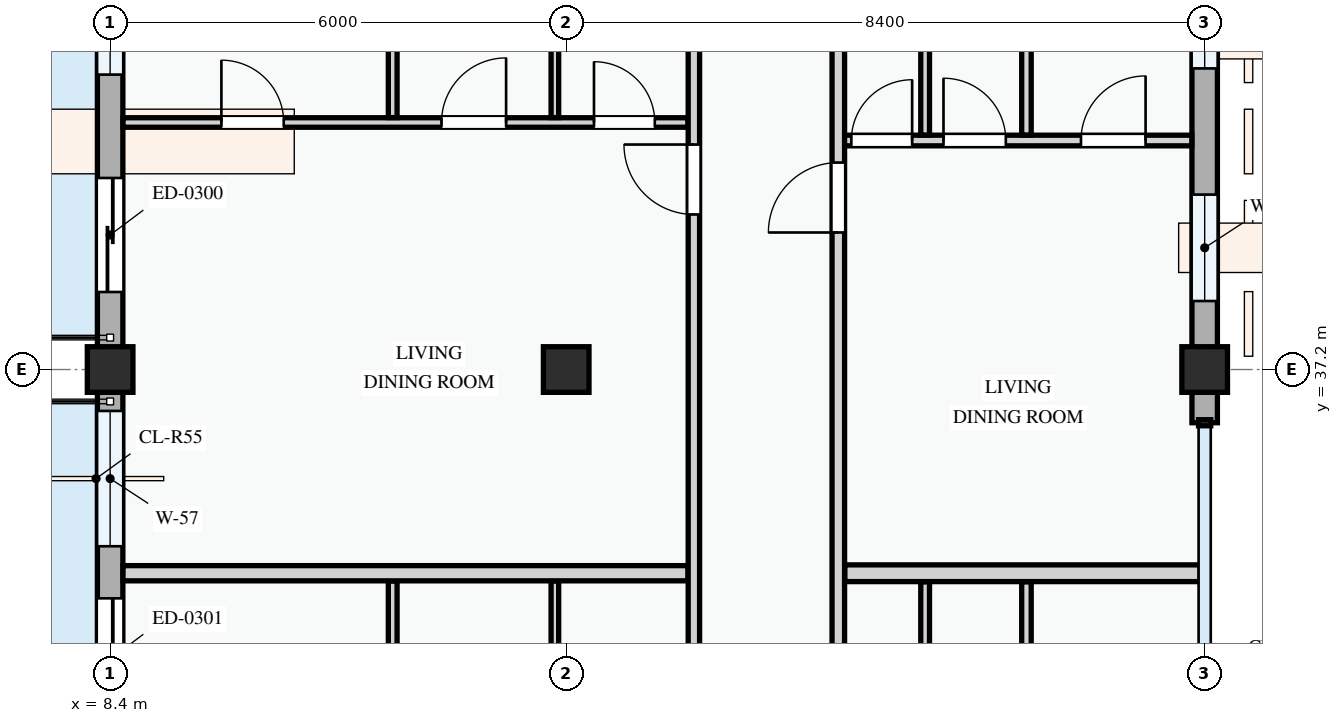
"""IFC4 building model, lengths in metres.
Left out: names, types, materials, properties, quantities, classifications, styles, units other than length and angle.
Written with IfcOpenShell. Run it as: python <this file> out.ifc"""

import sys

from ifc_helpers import new_model, si_unit, direction, frame, frame_2d, origin, origin_2d, place, context, subcontext, project, spatial, rectangle, extrude, element, fill, save


model = new_model("IFC4")
c1 = context("Model", 3, precision=1e-05, world=origin(), true_north=direction((0.0, 1.0)))
c2 = subcontext(c1, "Body", "Model", "MODEL_VIEW")
j1 = project(units=[si_unit("LENGTHUNIT", "METRE"), si_unit("PLANEANGLEUNIT", "RADIAN")], contexts=[c1])
p1 = place(None, origin())
s1 = spatial("IfcSite", under=j1, at=p1, CompositionType="ELEMENT")
p2 = place(p1, origin())
s2 = spatial("IfcBuilding", under=s1, at=p2, CompositionType="ELEMENT")
p3 = place(p2, frame((0.0, 0.0, 11.4)))
s3 = spatial("IfcBuildingStorey", under=s2, at=p3, CompositionType="ELEMENT", Elevation=11.4)
for number, where, z_axis, x_axis in (
    (1, (8.4, 37.2, 0.0), (0.0, 0.0, 1.0), (1.0, 0.0, 0.0)),
    (2, (14.4, 37.2, 0.0), (0.0, 0.0, 1.0), (1.0, 0.0, 0.0)),
    (3, (22.8, 37.2, 0.0), (0.0, 0.0, 1.0), (1.0, 0.0, 0.0)),
):
    element("IfcColumn", number, at=place(p3, frame(where, z_axis=z_axis, x_axis=x_axis)), inside=s3, PredefinedType="COLUMN", context=c2, shape_type="SweptSolid", body=[
        extrude(rectangle(XDim=0.6, YDim=0.6, at=origin_2d()), origin(), (0.0, 0.0, 1.0), 3.3),
    ])
p4 = place(p3, frame((22.8, 36.5, 0.0), z_axis=(0.0, 0.0, 1.0), x_axis=(0.0, 1.0, 0.0)))
e4 = element("IfcWall", 4, at=p4, inside=s3, PredefinedType="STANDARD", context=c2, shape_type="SweptSolid", body=[
    extrude(rectangle(XDim=0.7, YDim=0.335, at=frame_2d((0.35, 0.0))), origin(), (0.0, 0.0, 1.0), 2.425),
])
p5 = place(p3, frame((22.8, 37.2, 0.0), z_axis=(0.0, 0.0, 1.0), x_axis=(0.0, 1.0, 0.0)))
e5 = element("IfcWall", 5, at=p5, inside=s3, PredefinedType="STANDARD", context=c2, shape_type="SweptSolid", body=[
    extrude(rectangle(XDim=6.0, YDim=0.335, at=frame_2d((3.0, 0.0))), origin(), (0.0, 0.0, 1.0), 2.575),
])
p6 = place(p5, frame((0.901, 0.0, 0.78)))
e6 = element("IfcOpeningElement", 6, at=p6, cuts=e5, PredefinedType="OPENING", context=c2, shape_type="SweptSolid", body=[
    extrude(rectangle(XDim=1.4, YDim=1.45, at=frame_2d((0.7, 0.725))), frame((0.0, 0.177, 0.0), z_axis=(0.0, -1.0, 0.0), x_axis=(1.0, 0.0, 0.0)), (0.0, 0.0, 1.0), 0.355),
])
p7 = place(p5, frame((3.961, 0.0, 0.78)))
e7 = element("IfcOpeningElement", 7, at=p7, cuts=e5, PredefinedType="OPENING", context=c2, shape_type="SweptSolid", body=[
    extrude(rectangle(XDim=0.9, YDim=1.2, at=frame_2d((0.45, 0.6))), frame((0.0, 0.177, 0.0), z_axis=(0.0, -1.0, 0.0), x_axis=(1.0, 0.0, 0.0)), (0.0, 0.0, 1.0), 0.355),
])
p8 = place(p3, frame((8.4, 43.2, 0.0), z_axis=(0.0, 0.0, 1.0), x_axis=(0.0, -1.0, 0.0)))
e8 = element("IfcWall", 8, at=p8, inside=s3, PredefinedType="STANDARD", context=c2, shape_type="SweptSolid", body=[
    extrude(rectangle(XDim=6.0, YDim=0.335, at=frame_2d((3.0, 0.0))), origin(), (0.0, 0.0, 1.0), 2.575),
])
p9 = place(p8, frame((3.48, 0.0, 0.0)))
e9 = element("IfcOpeningElement", 9, at=p9, cuts=e8, PredefinedType="OPENING", context=c2, shape_type="SweptSolid", body=[
    extrude(rectangle(XDim=1.5, YDim=2.2, at=frame_2d((0.75, 1.1))), frame((0.0, 0.177, 0.0), z_axis=(0.0, -1.0, 0.0), x_axis=(1.0, 0.0, 0.0)), (0.0, 0.0, 1.0), 0.355),
])
p10 = place(p8, frame((0.82, 0.0, 0.78)))
e10 = element("IfcOpeningElement", 10, at=p10, cuts=e8, PredefinedType="OPENING", context=c2, shape_type="SweptSolid", body=[
    extrude(rectangle(XDim=1.3, YDim=1.4, at=frame_2d((0.65, 0.7))), frame((0.0, 0.177, 0.0), z_axis=(0.0, -1.0, 0.0), x_axis=(1.0, 0.0, 0.0)), (0.0, 0.0, 1.0), 0.355),
])
p11 = place(p3, frame((8.4, 37.2, 0.0), z_axis=(0.0, 0.0, 1.0), x_axis=(0.0, -1.0, 0.0)))
e11 = element("IfcWall", 11, at=p11, inside=s3, PredefinedType="STANDARD", context=c2, shape_type="SweptSolid", body=[
    extrude(rectangle(XDim=8.4, YDim=0.335, at=frame_2d((4.2, 0.0))), origin(), (0.0, 0.0, 1.0), 2.425),
])
p12 = place(p11, frame((3.01, 0.0, 0.0)))
e12 = element("IfcOpeningElement", 12, at=p12, cuts=e11, PredefinedType="OPENING", context=c2, shape_type="SweptSolid", body=[
    extrude(rectangle(XDim=1.6, YDim=2.2, at=frame_2d((0.8, 1.1))), frame((0.0, 0.177, 0.0), z_axis=(0.0, -1.0, 0.0), x_axis=(1.0, 0.0, 0.0)), (0.0, 0.0, 1.0), 0.355),
])
p13 = place(p11, frame((0.545, 0.0, 0.78)))
e13 = element("IfcOpeningElement", 13, at=p13, cuts=e11, PredefinedType="OPENING", context=c2, shape_type="SweptSolid", body=[
    extrude(rectangle(XDim=1.78, YDim=1.42, at=frame_2d((0.89, 0.71))), frame((0.0, 0.177, 0.0), z_axis=(0.0, -1.0, 0.0), x_axis=(1.0, 0.0, 0.0)), (0.0, 0.0, 1.0), 0.355),
])
p14 = place(p11, frame((5.695, 0.0, 0.78)))
e14 = element("IfcOpeningElement", 14, at=p14, cuts=e11, PredefinedType="OPENING", context=c2, shape_type="SweptSolid", body=[
    extrude(rectangle(XDim=1.48, YDim=1.52, at=frame_2d((0.74, 0.76))), frame((0.0, 0.177, 0.0), z_axis=(0.0, -1.0, 0.0), x_axis=(1.0, 0.0, 0.0)), (0.0, 0.0, 1.0), 0.355),
])
p15 = place(p3, frame((12.118, 27.054, 0.0), z_axis=(0.0, 0.0, 1.0), x_axis=(0.0, 1.0, 0.0)))
e15 = element("IfcWall", 15, at=p15, inside=s3, PredefinedType="PARTITIONING", context=c2, shape_type="SweptSolid", body=[
    extrude(rectangle(XDim=7.364, YDim=0.115, at=frame_2d((3.682, 0.0))), origin(), (0.0, 0.0, 1.0), 3.0),
])
p16 = place(p3, frame((14.251, 27.054, 0.0), z_axis=(0.0, 0.0, 1.0), x_axis=(0.0, 1.0, 0.0)))
e16 = element("IfcWall", 16, at=p16, inside=s3, PredefinedType="PARTITIONING", context=c2, shape_type="SweptSolid", body=[
    extrude(rectangle(XDim=7.364, YDim=0.1, at=frame_2d((3.682, 0.0))), origin(), (0.0, 0.0, 1.0), 2.425),
])
p17 = place(p3, frame((20.455, 27.125, 0.0), z_axis=(0.0, 0.0, 1.0), x_axis=(0.0, 1.0, 0.0)))
e17 = element("IfcWall", 17, at=p17, inside=s3, PredefinedType="PARTITIONING", context=c2, shape_type="SweptSolid", body=[
    extrude(rectangle(XDim=7.283, YDim=0.125, at=frame_2d((3.642, 0.0))), origin(), (0.0, 0.0, 1.0), 3.0),
])
p18 = place(p3, frame((19.122, 27.125, 0.0), z_axis=(0.0, 0.0, 1.0), x_axis=(0.0, 1.0, 0.0)))
e18 = element("IfcWall", 18, at=p18, inside=s3, PredefinedType="PARTITIONING", context=c2, shape_type="SweptSolid", body=[
    extrude(rectangle(XDim=7.283, YDim=0.115, at=frame_2d((3.642, 0.0))), origin(), (0.0, 0.0, 1.0), 3.0),
])
p19 = place(p3, frame((8.57, 40.45, 0.0), z_axis=(0.0, 0.0, 1.0), x_axis=(1.0, 0.0, 0.0)))
e19 = element("IfcWall", 19, at=p19, inside=s3, PredefinedType="PARTITIONING", context=c2, shape_type="SweptSolid", body=[
    extrude(rectangle(XDim=7.433, YDim=0.125, at=frame_2d((3.717, 0.0))), origin(), (0.0, 0.0, 1.0), 3.0),
])
p20 = place(p19, frame((1.294, 0.0, 0.0)))
e20 = element("IfcOpeningElement", 20, at=p20, cuts=e19, PredefinedType="OPENING", context=c2, shape_type="SweptSolid", body=[
    extrude(rectangle(XDim=0.82, YDim=2.08, at=frame_2d((0.41, 1.04))), frame((0.0, 0.073, 0.0), z_axis=(0.0, -1.0, 0.0), x_axis=(1.0, 0.0, 0.0)), (0.0, 0.0, 1.0), 0.145),
])
p21 = place(p19, frame((4.19, 0.0, 0.0)))
e21 = element("IfcOpeningElement", 21, at=p21, cuts=e19, PredefinedType="OPENING", context=c2, shape_type="SweptSolid", body=[
    extrude(rectangle(XDim=0.85, YDim=2.1, at=frame_2d((0.425, 1.05))), frame((0.0, 0.073, 0.0), z_axis=(0.0, -1.0, 0.0), x_axis=(1.0, 0.0, 0.0)), (0.0, 0.0, 1.0), 0.145),
])
p22 = place(p19, frame((6.196, 0.0, 0.0)))
e22 = element("IfcOpeningElement", 22, at=p22, cuts=e19, PredefinedType="OPENING", context=c2, shape_type="SweptSolid", body=[
    extrude(rectangle(XDim=0.8, YDim=2.1, at=frame_2d((0.4, 1.05))), frame((0.0, 0.073, 0.0), z_axis=(0.0, -1.0, 0.0), x_axis=(1.0, 0.0, 0.0)), (0.0, 0.0, 1.0), 0.145),
])
p23 = place(p3, frame((12.118, 40.514, 0.0), z_axis=(0.0, 0.0, 1.0), x_axis=(0.0, 1.0, 0.0)))
e23 = element("IfcWall", 23, at=p23, inside=s3, PredefinedType="PARTITIONING", context=c2, shape_type="SweptSolid", body=[
    extrude(rectangle(XDim=5.771, YDim=0.115, at=frame_2d((2.885, 0.0))), origin(), (0.0, 0.0, 1.0), 3.0),
])
p24 = place(p3, frame((14.251, 40.514, 0.0), z_axis=(0.0, 0.0, 1.0), x_axis=(0.0, 1.0, 0.0)))
e24 = element("IfcWall", 24, at=p24, inside=s3, PredefinedType="PARTITIONING", context=c2, shape_type="SweptSolid", body=[
    extrude(rectangle(XDim=5.771, YDim=0.1, at=frame_2d((2.885, 0.0))), origin(), (0.0, 0.0, 1.0), 2.425),
])
p25 = place(p3, frame((17.98, 40.213, 0.0), z_axis=(0.0, 0.0, 1.0), x_axis=(1.0, 0.0, 0.0)))
e25 = element("IfcWall", 25, at=p25, inside=s3, PredefinedType="PARTITIONING", context=c2, shape_type="SweptSolid", body=[
    extrude(rectangle(XDim=4.651, YDim=0.14, at=frame_2d((2.325, 0.0))), origin(), (0.0, 0.0, 1.0), 3.0),
])
p26 = place(p25, frame((0.171, 0.0, 0.0)))
e26 = element("IfcOpeningElement", 26, at=p26, cuts=e25, PredefinedType="OPENING", context=c2, shape_type="SweptSolid", body=[
    extrude(rectangle(XDim=0.8, YDim=2.1, at=frame_2d((0.4, 1.05))), frame((0.0, 0.08, 0.0), z_axis=(0.0, -1.0, 0.0), x_axis=(1.0, 0.0, 0.0)), (0.0, 0.0, 1.0), 0.16),
])
p27 = place(p25, frame((1.384, 0.0, 0.0)))
e27 = element("IfcOpeningElement", 27, at=p27, cuts=e25, PredefinedType="OPENING", context=c2, shape_type="SweptSolid", body=[
    extrude(rectangle(XDim=0.82, YDim=2.08, at=frame_2d((0.41, 1.04))), frame((0.0, 0.08, 0.0), z_axis=(0.0, -1.0, 0.0), x_axis=(1.0, 0.0, 0.0)), (0.0, 0.0, 1.0), 0.16),
])
p28 = place(p25, frame((3.193, 0.0, 0.0)))
e28 = element("IfcOpeningElement", 28, at=p28, cuts=e25, PredefinedType="OPENING", context=c2, shape_type="SweptSolid", body=[
    extrude(rectangle(XDim=0.85, YDim=2.1, at=frame_2d((0.425, 1.05))), frame((0.0, 0.08, 0.0), z_axis=(0.0, -1.0, 0.0), x_axis=(1.0, 0.0, 0.0)), (0.0, 0.0, 1.0), 0.16),
])
p29 = place(p3, frame((20.455, 40.285, 0.0), z_axis=(0.0, 0.0, 1.0), x_axis=(0.0, 1.0, 0.0)))
e29 = element("IfcWall", 29, at=p29, inside=s3, PredefinedType="PARTITIONING", context=c2, shape_type="SweptSolid", body=[
    extrude(rectangle(XDim=5.993, YDim=0.125, at=frame_2d((2.997, 0.0))), origin(), (0.0, 0.0, 1.0), 3.0),
])
p30 = place(p3, frame((19.122, 40.285, 0.0), z_axis=(0.0, 0.0, 1.0), x_axis=(0.0, 1.0, 0.0)))
e30 = element("IfcWall", 30, at=p30, inside=s3, PredefinedType="PARTITIONING", context=c2, shape_type="SweptSolid", body=[
    extrude(rectangle(XDim=5.993, YDim=0.115, at=frame_2d((2.997, 0.0))), origin(), (0.0, 0.0, 1.0), 3.0),
])
p31 = place(p3, frame((8.57, 34.52, 0.0), z_axis=(0.0, 0.0, 1.0), x_axis=(1.0, 0.0, 0.0)))
e31 = element("IfcWall", 31, at=p31, inside=s3, PredefinedType="PARTITIONING", context=c2, shape_type="SweptSolid", body=[
    extrude(rectangle(XDim=7.433, YDim=0.2, at=frame_2d((3.717, 0.0))), origin(), (0.0, 0.0, 1.0), 3.0),
])
p32 = place(p3, frame((18.064, 34.52, 0.0), z_axis=(0.0, 0.0, 1.0), x_axis=(1.0, 0.0, 0.0)))
e32 = element("IfcWall", 32, at=p32, inside=s3, PredefinedType="PARTITIONING", context=c2, shape_type="SweptSolid", body=[
    extrude(rectangle(XDim=4.676, YDim=0.22, at=frame_2d((2.338, 0.0))), origin(), (0.0, 0.0, 1.0), 3.0),
])
p33 = place(p3, frame((16.08, 22.66, 0.0), z_axis=(0.0, 0.0, 1.0), x_axis=(0.0, 1.0, 0.0)))
e33 = element("IfcWall", 33, at=p33, inside=s3, PredefinedType="PARTITIONING", context=c2, shape_type="SweptSolid", body=[
    extrude(rectangle(XDim=34.771, YDim=0.15, at=frame_2d((17.385, 0.0))), origin(), (0.0, 0.0, 1.0), 3.0),
])
p34 = place(p33, frame((2.672, 0.0, 0.0)))
e34 = element("IfcOpeningElement", 34, at=p34, cuts=e33, PredefinedType="OPENING", context=c2, shape_type="SweptSolid", body=[
    extrude(rectangle(XDim=0.92, YDim=2.1, at=frame_2d((0.46, 1.05))), frame((0.0, 0.085, 0.0), z_axis=(0.0, -1.0, 0.0), x_axis=(1.0, 0.0, 0.0)), (0.0, 0.0, 1.0), 0.17),
])
p35 = place(p33, frame((16.58, 0.0, 0.0)))
e35 = element("IfcOpeningElement", 35, at=p35, cuts=e33, PredefinedType="OPENING", context=c2, shape_type="SweptSolid", body=[
    extrude(rectangle(XDim=0.92, YDim=2.1, at=frame_2d((0.46, 1.05))), frame((0.0, 0.085, 0.0), z_axis=(0.0, -1.0, 0.0), x_axis=(1.0, 0.0, 0.0)), (0.0, 0.0, 1.0), 0.17),
])
p36 = place(p33, frame((24.315, 0.0, 0.0)))
e36 = element("IfcOpeningElement", 36, at=p36, cuts=e33, PredefinedType="OPENING", context=c2, shape_type="SweptSolid", body=[
    extrude(rectangle(XDim=0.96, YDim=2.12, at=frame_2d((0.48, 1.06))), frame((0.0, 0.085, 0.0), z_axis=(0.0, -1.0, 0.0), x_axis=(1.0, 0.0, 0.0)), (0.0, 0.0, 1.0), 0.17),
])
p37 = place(p3, frame((17.98, 22.66, 0.0), z_axis=(0.0, 0.0, 1.0), x_axis=(0.0, 1.0, 0.0)))
e37 = element("IfcWall", 37, at=p37, inside=s3, PredefinedType="PARTITIONING", context=c2, shape_type="SweptSolid", body=[
    extrude(rectangle(XDim=34.771, YDim=0.165, at=frame_2d((17.385, 0.0))), origin(), (0.0, 0.0, 1.0), 3.0),
])
p38 = place(p37, frame((2.633, 0.0, 0.0)))
e38 = element("IfcOpeningElement", 38, at=p38, cuts=e37, PredefinedType="OPENING", context=c2, shape_type="SweptSolid", body=[
    extrude(rectangle(XDim=0.92, YDim=2.1, at=frame_2d((0.46, 1.05))), frame((0.0, 0.093, 0.0), z_axis=(0.0, -1.0, 0.0), x_axis=(1.0, 0.0, 0.0)), (0.0, 0.0, 1.0), 0.185),
])
p39 = place(p37, frame((16.343, 0.0, 0.0)))
e39 = element("IfcOpeningElement", 39, at=p39, cuts=e37, PredefinedType="OPENING", context=c2, shape_type="SweptSolid", body=[
    extrude(rectangle(XDim=0.92, YDim=2.1, at=frame_2d((0.46, 1.05))), frame((0.0, 0.093, 0.0), z_axis=(0.0, -1.0, 0.0), x_axis=(1.0, 0.0, 0.0)), (0.0, 0.0, 1.0), 0.185),
])
p40 = place(p37, frame((24.313, 0.0, 0.0)))
e40 = element("IfcOpeningElement", 40, at=p40, cuts=e37, PredefinedType="OPENING", context=c2, shape_type="SweptSolid", body=[
    extrude(rectangle(XDim=0.92, YDim=2.1, at=frame_2d((0.46, 1.05))), frame((0.0, 0.093, 0.0), z_axis=(0.0, -1.0, 0.0), x_axis=(1.0, 0.0, 0.0)), (0.0, 0.0, 1.0), 0.185),
])
p41 = place(p6, origin())
e41 = element("IfcWindow", 41, at=p41, inside=s3, PartitioningType="SINGLE_PANEL", PredefinedType="WINDOW", context=c2, shape_type="SweptSolid", body=[
    extrude(rectangle(XDim=1.4, YDim=1.45, at=frame_2d((0.7, 0.725))), frame((0.0, 0.03, 0.0), z_axis=(0.0, -1.0, 0.0), x_axis=(1.0, 0.0, 0.0)), (0.0, 0.0, 1.0), 0.06),
])
fill(e6, e41)
p42 = place(p7, origin())
e42 = element("IfcWindow", 42, at=p42, inside=s3, PartitioningType="SINGLE_PANEL", PredefinedType="WINDOW", context=c2, shape_type="SweptSolid", body=[
    extrude(rectangle(XDim=0.9, YDim=1.2, at=frame_2d((0.45, 0.6))), frame((0.0, 0.03, 0.0), z_axis=(0.0, -1.0, 0.0), x_axis=(1.0, 0.0, 0.0)), (0.0, 0.0, 1.0), 0.06),
])
fill(e7, e42)
p43 = place(p9, frame((1.5, 0.0, 0.0), z_axis=(0.0, 0.0, 1.0), x_axis=(-1.0, 0.0, 0.0)))
e43 = element("IfcDoor", 43, at=p43, inside=s3, OperationType="SLIDING_TO_RIGHT", PredefinedType="DOOR", context=c2, shape_type="SweptSolid", body=[
    extrude(rectangle(XDim=1.5, YDim=2.2, at=frame_2d((0.75, 1.1))), frame((0.0, 0.025, 0.0), z_axis=(0.0, -1.0, 0.0), x_axis=(1.0, 0.0, 0.0)), (0.0, 0.0, 1.0), 0.05),
])
fill(e9, e43)
p44 = place(p10, origin())
e44 = element("IfcWindow", 44, at=p44, inside=s3, PartitioningType="SINGLE_PANEL", PredefinedType="WINDOW", context=c2, shape_type="SweptSolid", body=[
    extrude(rectangle(XDim=1.3, YDim=1.4, at=frame_2d((0.65, 0.7))), frame((0.0, 0.03, 0.0), z_axis=(0.0, -1.0, 0.0), x_axis=(1.0, 0.0, 0.0)), (0.0, 0.0, 1.0), 0.06),
])
fill(e10, e44)
p45 = place(p12, frame((1.6, 0.0, 0.0), z_axis=(0.0, 0.0, 1.0), x_axis=(-1.0, 0.0, 0.0)))
e45 = element("IfcDoor", 45, at=p45, inside=s3, OperationType="SLIDING_TO_LEFT", PredefinedType="DOOR", context=c2, shape_type="SweptSolid", body=[
    extrude(rectangle(XDim=1.6, YDim=2.2, at=frame_2d((0.8, 1.1))), frame((0.0, 0.025, 0.0), z_axis=(0.0, -1.0, 0.0), x_axis=(1.0, 0.0, 0.0)), (0.0, 0.0, 1.0), 0.05),
])
fill(e12, e45)
p46 = place(p13, origin())
e46 = element("IfcWindow", 46, at=p46, inside=s3, PartitioningType="DOUBLE_PANEL_VERTICAL", PredefinedType="WINDOW", context=c2, shape_type="SweptSolid", body=[
    extrude(rectangle(XDim=1.78, YDim=1.42, at=frame_2d((0.89, 0.71))), frame((0.0, 0.03, 0.0), z_axis=(0.0, -1.0, 0.0), x_axis=(1.0, 0.0, 0.0)), (0.0, 0.0, 1.0), 0.06),
])
fill(e13, e46)
p47 = place(p20, origin())
e47 = element("IfcDoor", 47, at=p47, inside=s3, OperationType="SINGLE_SWING_LEFT", PredefinedType="DOOR", context=c2, shape_type="SweptSolid", body=[
    extrude(rectangle(XDim=0.82, YDim=2.08, at=frame_2d((0.41, 1.04))), frame((0.0, 0.025, 0.0), z_axis=(0.0, -1.0, 0.0), x_axis=(1.0, 0.0, 0.0)), (0.0, 0.0, 1.0), 0.05),
])
fill(e20, e47)
p48 = place(p21, origin())
e48 = element("IfcDoor", 48, at=p48, inside=s3, OperationType="SINGLE_SWING_RIGHT", PredefinedType="DOOR", context=c2, shape_type="SweptSolid", body=[
    extrude(rectangle(XDim=0.85, YDim=2.1, at=frame_2d((0.425, 1.05))), frame((0.0, 0.025, 0.0), z_axis=(0.0, -1.0, 0.0), x_axis=(1.0, 0.0, 0.0)), (0.0, 0.0, 1.0), 0.05),
])
fill(e21, e48)
p49 = place(p22, origin())
e49 = element("IfcDoor", 49, at=p49, inside=s3, OperationType="SINGLE_SWING_LEFT", PredefinedType="DOOR", context=c2, shape_type="SweptSolid", body=[
    extrude(rectangle(XDim=0.8, YDim=2.1, at=frame_2d((0.4, 1.05))), frame((0.0, 0.025, 0.0), z_axis=(0.0, -1.0, 0.0), x_axis=(1.0, 0.0, 0.0)), (0.0, 0.0, 1.0), 0.05),
])
fill(e22, e49)
p50 = place(p26, origin())
e50 = element("IfcDoor", 50, at=p50, inside=s3, OperationType="SINGLE_SWING_RIGHT", PredefinedType="DOOR", context=c2, shape_type="SweptSolid", body=[
    extrude(rectangle(XDim=0.8, YDim=2.1, at=frame_2d((0.4, 1.05))), frame((0.0, 0.025, 0.0), z_axis=(0.0, -1.0, 0.0), x_axis=(1.0, 0.0, 0.0)), (0.0, 0.0, 1.0), 0.05),
])
fill(e26, e50)
p51 = place(p27, origin())
e51 = element("IfcDoor", 51, at=p51, inside=s3, OperationType="SINGLE_SWING_LEFT", PredefinedType="DOOR", context=c2, shape_type="SweptSolid", body=[
    extrude(rectangle(XDim=0.82, YDim=2.08, at=frame_2d((0.41, 1.04))), frame((0.0, 0.025, 0.0), z_axis=(0.0, -1.0, 0.0), x_axis=(1.0, 0.0, 0.0)), (0.0, 0.0, 1.0), 0.05),
])
fill(e27, e51)
p52 = place(p28, origin())
e52 = element("IfcDoor", 52, at=p52, inside=s3, OperationType="SINGLE_SWING_RIGHT", PredefinedType="DOOR", context=c2, shape_type="SweptSolid", body=[
    extrude(rectangle(XDim=0.85, YDim=2.1, at=frame_2d((0.425, 1.05))), frame((0.0, 0.025, 0.0), z_axis=(0.0, -1.0, 0.0), x_axis=(1.0, 0.0, 0.0)), (0.0, 0.0, 1.0), 0.05),
])
fill(e28, e52)
p53 = place(p35, origin())
e53 = element("IfcDoor", 53, at=p53, inside=s3, OperationType="SINGLE_SWING_RIGHT", PredefinedType="DOOR", context=c2, shape_type="SweptSolid", body=[
    extrude(rectangle(XDim=0.92, YDim=2.1, at=frame_2d((0.46, 1.05))), frame((0.0, 0.025, 0.0), z_axis=(0.0, -1.0, 0.0), x_axis=(1.0, 0.0, 0.0)), (0.0, 0.0, 1.0), 0.05),
])
fill(e35, e53)
p54 = place(p39, origin())
e54 = element("IfcDoor", 54, at=p54, inside=s3, OperationType="SINGLE_SWING_LEFT", PredefinedType="DOOR", context=c2, shape_type="SweptSolid", body=[
    extrude(rectangle(XDim=0.92, YDim=2.1, at=frame_2d((0.46, 1.05))), frame((0.0, 0.025, 0.0), z_axis=(0.0, -1.0, 0.0), x_axis=(1.0, 0.0, 0.0)), (0.0, 0.0, 1.0), 0.05),
])
fill(e39, e54)
save(model, sys.argv[1])
